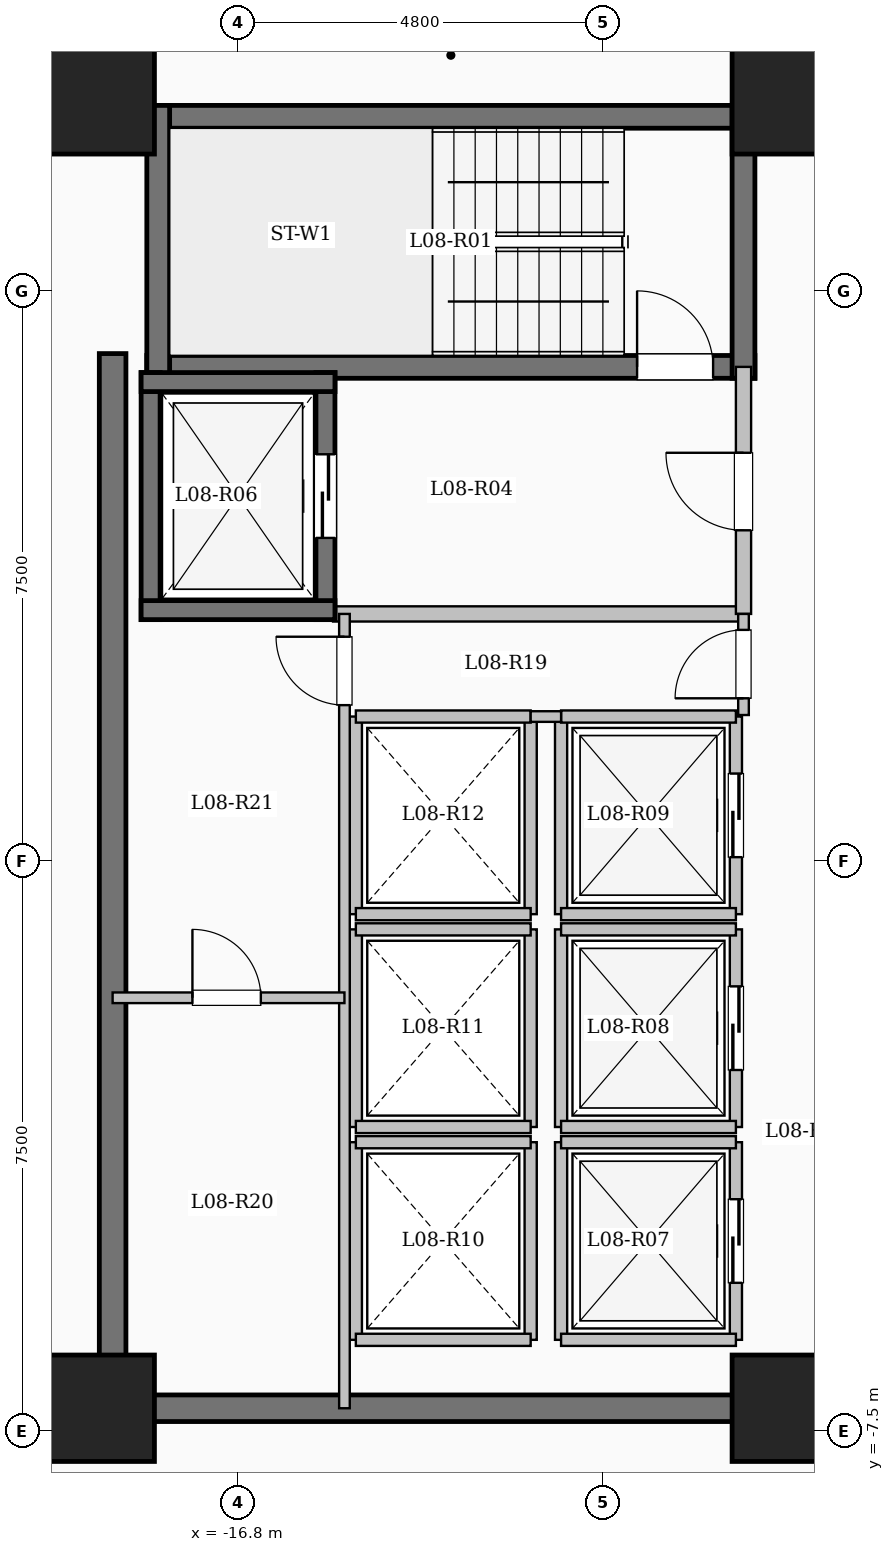
"""IFC4 building model, lengths in metres.
Left out: names, types, materials, properties, quantities, classifications, styles, units other than length and angle.
Written with IfcOpenShell. Run it as: python <this file> out.ifc"""

import sys

from ifc_helpers import new_model, si_unit, direction, frame, frame_2d, origin, origin_2d, place, context, subcontext, project, spatial, rectangle, extrude, element, fill, save


model = new_model("IFC4")
c1 = context("Model", 3, precision=1e-05, world=origin(), true_north=direction((0.0, 1.0)))
c2 = subcontext(c1, "Body", "Model", "MODEL_VIEW")
j1 = project(units=[si_unit("LENGTHUNIT", "METRE"), si_unit("PLANEANGLEUNIT", "RADIAN")], contexts=[c1])
p1 = place(None, origin())
s1 = spatial("IfcSite", under=j1, at=p1, CompositionType="ELEMENT")
p2 = place(p1, origin())
s2 = spatial("IfcBuilding", under=s1, at=p2, CompositionType="ELEMENT")
p3 = place(p2, frame((0.0, 0.0, 34.05)))
s3 = spatial("IfcBuildingStorey", under=s2, at=p3, CompositionType="ELEMENT", Elevation=34.05)
for number, where, z_axis, x_axis in (
    (1, (-9.6, -7.2, 0.0), (0.0, 0.0, 1.0), (1.0, 0.0, 0.0)),
    (2, (-9.6, 10.0, 0.0), (0.0, 0.0, 1.0), (1.0, 0.0, 0.0)),
    (3, (-18.6, -7.2, 0.0), (0.0, 0.0, 1.0), (1.0, 0.0, 0.0)),
    (4, (-18.6, 10.0, 0.0), (0.0, 0.0, 1.0), (1.0, 0.0, 0.0)),
):
    element("IfcColumn", number, at=place(p3, frame(where, z_axis=z_axis, x_axis=x_axis)), inside=s3, PredefinedType="COLUMN", context=c2, shape_type="SweptSolid", body=[
        extrude(rectangle(XDim=1.4, YDim=1.4, at=origin_2d()), origin(), (0.0, 0.0, 1.0), 3.35),
    ])
p4 = place(p3, frame((-18.0, 9.79, 0.0), z_axis=(0.0, 0.0, 1.0), x_axis=(1.0, 0.0, 0.0)))
e5 = element("IfcWall", 5, at=p4, inside=s3, PredefinedType="SHEAR", context=c2, shape_type="SweptSolid", body=[
    extrude(rectangle(XDim=8.0, YDim=0.3, at=frame_2d((4.0, 0.0))), origin(), (0.0, 0.0, 1.0), 3.35),
])
p5 = place(p3, frame((-18.0, 6.5, 0.0), z_axis=(0.0, 0.0, 1.0), x_axis=(1.0, 0.0, 0.0)))
e6 = element("IfcWall", 6, at=p5, inside=s3, PredefinedType="SHEAR", context=c2, shape_type="SweptSolid", body=[
    extrude(rectangle(XDim=8.0, YDim=0.3, at=frame_2d((4.0, 0.0))), origin(), (0.0, 0.0, 1.0), 3.35),
])
p6 = place(p5, frame((6.45, 0.0, 0.0)))
e7 = element("IfcOpeningElement", 7, at=p6, cuts=e6, PredefinedType="OPENING", context=c2, shape_type="SweptSolid", body=[
    extrude(rectangle(XDim=1.0, YDim=2.15, at=frame_2d((0.5, 1.075))), frame((0.0, 0.16, 0.0), z_axis=(0.0, -1.0, 0.0), x_axis=(1.0, 0.0, 0.0)), (0.0, 0.0, 1.0), 0.32),
])
for number, where, z_axis, x_axis in (
    (8, (-17.85, 6.35, 0.0), (0.0, 0.0, 1.0), (0.0, 1.0, 0.0)),
    (9, (-10.15, 6.35, 0.0), (0.0, 0.0, 1.0), (0.0, 1.0, 0.0)),
):
    element("IfcWall", number, at=place(p3, frame(where, z_axis=z_axis, x_axis=x_axis)), inside=s3, PredefinedType="SHEAR", context=c2, shape_type="SweptSolid", body=[
        extrude(rectangle(XDim=3.59, YDim=0.3, at=frame_2d((1.795, 0.0))), origin(), (0.0, 0.0, 1.0), 3.35),
    ])
p7 = place(p3, frame((-15.55, 3.25, 0.0), z_axis=(0.0, 0.0, 1.0), x_axis=(1.0, 0.0, 0.0)))
e10 = element("IfcWall", 10, at=p7, inside=s3, PredefinedType="SOLIDWALL", context=c2, shape_type="SweptSolid", body=[
    extrude(rectangle(XDim=5.4, YDim=0.2, at=frame_2d((2.7, 0.0))), origin(), (0.0, 0.0, 1.0), 3.1),
])
p8 = place(p3, frame((-10.15, 3.25, 0.0), z_axis=(0.0, 0.0, 1.0), x_axis=(0.0, 1.0, 0.0)))
e11 = element("IfcWall", 11, at=p8, inside=s3, PredefinedType="SOLIDWALL", context=c2, shape_type="SweptSolid", body=[
    extrude(rectangle(XDim=3.25, YDim=0.2, at=frame_2d((1.625, 0.0))), origin(), (0.0, 0.0, 1.0), 3.1),
])
p9 = place(p8, frame((1.1, 0.0, 0.0)))
e12 = element("IfcOpeningElement", 12, at=p9, cuts=e11, PredefinedType="OPENING", context=c2, shape_type="SweptSolid", body=[
    extrude(rectangle(XDim=1.02, YDim=2.15, at=frame_2d((0.51, 1.075))), frame((0.0, 0.11, 0.0), z_axis=(0.0, -1.0, 0.0), x_axis=(1.0, 0.0, 0.0)), (0.0, 0.0, 1.0), 0.22),
])
p10 = place(p3, frame((-17.95, 3.175, 0.0), z_axis=(0.0, 0.0, 1.0), x_axis=(0.0, 1.0, 0.0)))
e13 = element("IfcWall", 13, at=p10, inside=s3, PredefinedType="SHEAR", context=c2, shape_type="SweptSolid", body=[
    extrude(rectangle(XDim=3.25, YDim=0.25, at=frame_2d((1.625, 0.0))), origin(), (0.0, 0.0, 1.0), 3.35),
])
p11 = place(p3, frame((-15.65, 3.175, 0.0), z_axis=(0.0, 0.0, 1.0), x_axis=(0.0, 1.0, 0.0)))
e14 = element("IfcWall", 14, at=p11, inside=s3, PredefinedType="SHEAR", context=c2, shape_type="SweptSolid", body=[
    extrude(rectangle(XDim=3.25, YDim=0.25, at=frame_2d((1.625, 0.0))), origin(), (0.0, 0.0, 1.0), 3.35),
])
p12 = place(p11, frame((1.075, 0.0, 0.0)))
e15 = element("IfcOpeningElement", 15, at=p12, cuts=e14, PredefinedType="OPENING", context=c2, shape_type="SweptSolid", body=[
    extrude(rectangle(XDim=1.1, YDim=2.15, at=frame_2d((0.55, 1.075))), frame((0.0, 0.135, 0.0), z_axis=(0.0, -1.0, 0.0), x_axis=(1.0, 0.0, 0.0)), (0.0, 0.0, 1.0), 0.27),
])
for number, where, z_axis, x_axis in (
    (16, (-18.075, 3.3, 0.0), (0.0, 0.0, 1.0), (1.0, 0.0, 0.0)),
    (17, (-18.075, 6.3, 0.0), (0.0, 0.0, 1.0), (1.0, 0.0, 0.0)),
):
    element("IfcWall", number, at=place(p3, frame(where, z_axis=z_axis, x_axis=x_axis)), inside=s3, PredefinedType="SHEAR", context=c2, shape_type="SweptSolid", body=[
        extrude(rectangle(XDim=2.55, YDim=0.25, at=frame_2d((1.275, 0.0))), origin(), (0.0, 0.0, 1.0), 3.35),
    ])
p13 = place(p3, frame((-12.55, -6.3, 0.0), z_axis=(0.0, 0.0, 1.0), x_axis=(0.0, 1.0, 0.0)))
e18 = element("IfcWall", 18, at=p13, inside=s3, PredefinedType="SOLIDWALL", context=c2, shape_type="SweptSolid", body=[
    extrude(rectangle(XDim=2.6, YDim=0.16, at=frame_2d((1.3, 0.0))), origin(), (0.0, 0.0, 1.0), 3.1),
])
p14 = place(p3, frame((-10.25, -6.3, 0.0), z_axis=(0.0, 0.0, 1.0), x_axis=(0.0, 1.0, 0.0)))
e19 = element("IfcWall", 19, at=p14, inside=s3, PredefinedType="SOLIDWALL", context=c2, shape_type="SweptSolid", body=[
    extrude(rectangle(XDim=2.6, YDim=0.16, at=frame_2d((1.3, 0.0))), origin(), (0.0, 0.0, 1.0), 3.1),
])
p15 = place(p14, frame((0.75, 0.0, 0.0)))
e20 = element("IfcOpeningElement", 20, at=p15, cuts=e19, PredefinedType="OPENING", context=c2, shape_type="SweptSolid", body=[
    extrude(rectangle(XDim=1.1, YDim=2.15, at=frame_2d((0.55, 1.075))), frame((0.0, 0.09, 0.0), z_axis=(0.0, -1.0, 0.0), x_axis=(1.0, 0.0, 0.0)), (0.0, 0.0, 1.0), 0.18),
])
for number, where, z_axis, x_axis in (
    (21, (-12.55, -6.3, 0.0), (0.0, 0.0, 1.0), (1.0, 0.0, 0.0)),
    (22, (-12.55, -3.7, 0.0), (0.0, 0.0, 1.0), (1.0, 0.0, 0.0)),
):
    element("IfcWall", number, at=place(p3, frame(where, z_axis=z_axis, x_axis=x_axis)), inside=s3, PredefinedType="SOLIDWALL", context=c2, shape_type="SweptSolid", body=[
        extrude(rectangle(XDim=2.3, YDim=0.16, at=frame_2d((1.15, 0.0))), origin(), (0.0, 0.0, 1.0), 3.1),
    ])
p16 = place(p3, frame((-12.55, -3.5, 0.0), z_axis=(0.0, 0.0, 1.0), x_axis=(0.0, 1.0, 0.0)))
e23 = element("IfcWall", 23, at=p16, inside=s3, PredefinedType="SOLIDWALL", context=c2, shape_type="SweptSolid", body=[
    extrude(rectangle(XDim=2.6, YDim=0.16, at=frame_2d((1.3, 0.0))), origin(), (0.0, 0.0, 1.0), 3.1),
])
p17 = place(p3, frame((-10.25, -3.5, 0.0), z_axis=(0.0, 0.0, 1.0), x_axis=(0.0, 1.0, 0.0)))
e24 = element("IfcWall", 24, at=p17, inside=s3, PredefinedType="SOLIDWALL", context=c2, shape_type="SweptSolid", body=[
    extrude(rectangle(XDim=2.6, YDim=0.16, at=frame_2d((1.3, 0.0))), origin(), (0.0, 0.0, 1.0), 3.1),
])
p18 = place(p17, frame((0.75, 0.0, 0.0)))
e25 = element("IfcOpeningElement", 25, at=p18, cuts=e24, PredefinedType="OPENING", context=c2, shape_type="SweptSolid", body=[
    extrude(rectangle(XDim=1.1, YDim=2.15, at=frame_2d((0.55, 1.075))), frame((0.0, 0.09, 0.0), z_axis=(0.0, -1.0, 0.0), x_axis=(1.0, 0.0, 0.0)), (0.0, 0.0, 1.0), 0.18),
])
for number, where, z_axis, x_axis in (
    (26, (-12.55, -3.5, 0.0), (0.0, 0.0, 1.0), (1.0, 0.0, 0.0)),
    (27, (-12.55, -0.9, 0.0), (0.0, 0.0, 1.0), (1.0, 0.0, 0.0)),
):
    element("IfcWall", number, at=place(p3, frame(where, z_axis=z_axis, x_axis=x_axis)), inside=s3, PredefinedType="SOLIDWALL", context=c2, shape_type="SweptSolid", body=[
        extrude(rectangle(XDim=2.3, YDim=0.16, at=frame_2d((1.15, 0.0))), origin(), (0.0, 0.0, 1.0), 3.1),
    ])
p19 = place(p3, frame((-12.55, -0.7, 0.0), z_axis=(0.0, 0.0, 1.0), x_axis=(0.0, 1.0, 0.0)))
e28 = element("IfcWall", 28, at=p19, inside=s3, PredefinedType="SOLIDWALL", context=c2, shape_type="SweptSolid", body=[
    extrude(rectangle(XDim=2.6, YDim=0.16, at=frame_2d((1.3, 0.0))), origin(), (0.0, 0.0, 1.0), 3.1),
])
p20 = place(p3, frame((-10.25, -0.7, 0.0), z_axis=(0.0, 0.0, 1.0), x_axis=(0.0, 1.0, 0.0)))
e29 = element("IfcWall", 29, at=p20, inside=s3, PredefinedType="SOLIDWALL", context=c2, shape_type="SweptSolid", body=[
    extrude(rectangle(XDim=2.6, YDim=0.16, at=frame_2d((1.3, 0.0))), origin(), (0.0, 0.0, 1.0), 3.1),
])
p21 = place(p20, frame((0.75, 0.0, 0.0)))
e30 = element("IfcOpeningElement", 30, at=p21, cuts=e29, PredefinedType="OPENING", context=c2, shape_type="SweptSolid", body=[
    extrude(rectangle(XDim=1.1, YDim=2.15, at=frame_2d((0.55, 1.075))), frame((0.0, 0.09, 0.0), z_axis=(0.0, -1.0, 0.0), x_axis=(1.0, 0.0, 0.0)), (0.0, 0.0, 1.0), 0.18),
])
for number, where, z_axis, x_axis in (
    (31, (-12.55, -0.7, 0.0), (0.0, 0.0, 1.0), (1.0, 0.0, 0.0)),
    (32, (-12.55, 1.9, 0.0), (0.0, 0.0, 1.0), (1.0, 0.0, 0.0)),
):
    element("IfcWall", number, at=place(p3, frame(where, z_axis=z_axis, x_axis=x_axis)), inside=s3, PredefinedType="SOLIDWALL", context=c2, shape_type="SweptSolid", body=[
        extrude(rectangle(XDim=2.3, YDim=0.16, at=frame_2d((1.15, 0.0))), origin(), (0.0, 0.0, 1.0), 3.1),
    ])
for number, where, z_axis, x_axis in (
    (33, (-15.25, -6.3, 0.0), (0.0, 0.0, 1.0), (0.0, 1.0, 0.0)),
    (34, (-12.95, -6.3, 0.0), (0.0, 0.0, 1.0), (0.0, 1.0, 0.0)),
):
    element("IfcWall", number, at=place(p3, frame(where, z_axis=z_axis, x_axis=x_axis)), inside=s3, PredefinedType="SOLIDWALL", context=c2, shape_type="SweptSolid", body=[
        extrude(rectangle(XDim=2.6, YDim=0.16, at=frame_2d((1.3, 0.0))), origin(), (0.0, 0.0, 1.0), 3.1),
    ])
for number, where, z_axis, x_axis in (
    (35, (-15.25, -6.3, 0.0), (0.0, 0.0, 1.0), (1.0, 0.0, 0.0)),
    (36, (-15.25, -3.7, 0.0), (0.0, 0.0, 1.0), (1.0, 0.0, 0.0)),
):
    element("IfcWall", number, at=place(p3, frame(where, z_axis=z_axis, x_axis=x_axis)), inside=s3, PredefinedType="SOLIDWALL", context=c2, shape_type="SweptSolid", body=[
        extrude(rectangle(XDim=2.3, YDim=0.16, at=frame_2d((1.15, 0.0))), origin(), (0.0, 0.0, 1.0), 3.1),
    ])
for number, where, z_axis, x_axis in (
    (37, (-15.25, -3.5, 0.0), (0.0, 0.0, 1.0), (0.0, 1.0, 0.0)),
    (38, (-12.95, -3.5, 0.0), (0.0, 0.0, 1.0), (0.0, 1.0, 0.0)),
):
    element("IfcWall", number, at=place(p3, frame(where, z_axis=z_axis, x_axis=x_axis)), inside=s3, PredefinedType="SOLIDWALL", context=c2, shape_type="SweptSolid", body=[
        extrude(rectangle(XDim=2.6, YDim=0.16, at=frame_2d((1.3, 0.0))), origin(), (0.0, 0.0, 1.0), 3.1),
    ])
for number, where, z_axis, x_axis in (
    (39, (-15.25, -3.5, 0.0), (0.0, 0.0, 1.0), (1.0, 0.0, 0.0)),
    (40, (-15.25, -0.9, 0.0), (0.0, 0.0, 1.0), (1.0, 0.0, 0.0)),
):
    element("IfcWall", number, at=place(p3, frame(where, z_axis=z_axis, x_axis=x_axis)), inside=s3, PredefinedType="SOLIDWALL", context=c2, shape_type="SweptSolid", body=[
        extrude(rectangle(XDim=2.3, YDim=0.16, at=frame_2d((1.15, 0.0))), origin(), (0.0, 0.0, 1.0), 3.1),
    ])
for number, where, z_axis, x_axis in (
    (41, (-15.25, -0.7, 0.0), (0.0, 0.0, 1.0), (0.0, 1.0, 0.0)),
    (42, (-12.95, -0.7, 0.0), (0.0, 0.0, 1.0), (0.0, 1.0, 0.0)),
):
    element("IfcWall", number, at=place(p3, frame(where, z_axis=z_axis, x_axis=x_axis)), inside=s3, PredefinedType="SOLIDWALL", context=c2, shape_type="SweptSolid", body=[
        extrude(rectangle(XDim=2.6, YDim=0.16, at=frame_2d((1.3, 0.0))), origin(), (0.0, 0.0, 1.0), 3.1),
    ])
for number, where, z_axis, x_axis in (
    (43, (-15.25, -0.7, 0.0), (0.0, 0.0, 1.0), (1.0, 0.0, 0.0)),
    (44, (-15.25, 1.9, 0.0), (0.0, 0.0, 1.0), (1.0, 0.0, 0.0)),
):
    element("IfcWall", number, at=place(p3, frame(where, z_axis=z_axis, x_axis=x_axis)), inside=s3, PredefinedType="SOLIDWALL", context=c2, shape_type="SweptSolid", body=[
        extrude(rectangle(XDim=2.3, YDim=0.16, at=frame_2d((1.15, 0.0))), origin(), (0.0, 0.0, 1.0), 3.1),
    ])
p22 = place(p3, frame((-18.45, -7.375, 0.0), z_axis=(0.0, 0.0, 1.0), x_axis=(0.0, 1.0, 0.0)))
e45 = element("IfcWall", 45, at=p22, inside=s3, PredefinedType="SHEAR", context=c2, shape_type="SweptSolid", body=[
    extrude(rectangle(XDim=14.05, YDim=0.35, at=frame_2d((7.025, 0.0))), origin(), (0.0, 0.0, 1.0), 3.35),
])
p23 = place(p3, frame((-18.625, -7.2, 0.0), z_axis=(0.0, 0.0, 1.0), x_axis=(1.0, 0.0, 0.0)))
e46 = element("IfcWall", 46, at=p23, inside=s3, PredefinedType="SHEAR", context=c2, shape_type="SweptSolid", body=[
    extrude(rectangle(XDim=8.55, YDim=0.35, at=frame_2d((4.275, 0.0))), origin(), (0.0, 0.0, 1.0), 3.35),
])
p24 = place(p3, frame((-12.95, 1.9, 0.0), z_axis=(0.0, 0.0, 1.0), x_axis=(1.0, 0.0, 0.0)))
e47 = element("IfcWall", 47, at=p24, inside=s3, PredefinedType="PARTITIONING", context=c2, shape_type="SweptSolid", body=[
    extrude(rectangle(XDim=0.4, YDim=0.14, at=frame_2d((0.2, 0.0))), origin(), (0.0, 0.0, 1.0), 3.1),
])
p25 = place(p3, frame((-10.15, 1.92, 0.0), z_axis=(0.0, 0.0, 1.0), x_axis=(0.0, 1.0, 0.0)))
e48 = element("IfcWall", 48, at=p25, inside=s3, PredefinedType="PARTITIONING", context=c2, shape_type="SweptSolid", body=[
    extrude(rectangle(XDim=1.33, YDim=0.14, at=frame_2d((0.665, 0.0))), origin(), (0.0, 0.0, 1.0), 3.1),
])
p26 = place(p25, frame((0.22, 0.0, 0.0)))
e49 = element("IfcOpeningElement", 49, at=p26, cuts=e48, PredefinedType="OPENING", context=c2, shape_type="SweptSolid", body=[
    extrude(rectangle(XDim=0.9, YDim=2.08, at=frame_2d((0.45, 1.04))), frame((0.0, 0.08, 0.0), z_axis=(0.0, -1.0, 0.0), x_axis=(1.0, 0.0, 0.0)), (0.0, 0.0, 1.0), 0.16),
])
p27 = place(p3, frame((-15.4, -7.2, 0.0), z_axis=(0.0, 0.0, 1.0), x_axis=(0.0, 1.0, 0.0)))
e50 = element("IfcWall", 50, at=p27, inside=s3, PredefinedType="PARTITIONING", context=c2, shape_type="SweptSolid", body=[
    extrude(rectangle(XDim=10.45, YDim=0.14, at=frame_2d((5.225, 0.0))), origin(), (0.0, 0.0, 1.0), 3.1),
])
p28 = place(p27, frame((9.25, 0.0, 0.0)))
e51 = element("IfcOpeningElement", 51, at=p28, cuts=e50, PredefinedType="OPENING", context=c2, shape_type="SweptSolid", body=[
    extrude(rectangle(XDim=0.9, YDim=2.08, at=frame_2d((0.45, 1.04))), frame((0.0, 0.08, 0.0), z_axis=(0.0, -1.0, 0.0), x_axis=(1.0, 0.0, 0.0)), (0.0, 0.0, 1.0), 0.16),
])
p29 = place(p3, frame((-18.45, -1.8, 0.0), z_axis=(0.0, 0.0, 1.0), x_axis=(1.0, 0.0, 0.0)))
e52 = element("IfcWall", 52, at=p29, inside=s3, PredefinedType="PARTITIONING", context=c2, shape_type="SweptSolid", body=[
    extrude(rectangle(XDim=3.05, YDim=0.14, at=frame_2d((1.525, 0.0))), origin(), (0.0, 0.0, 1.0), 3.1),
])
p30 = place(p29, frame((1.05, 0.0, 0.0)))
e53 = element("IfcOpeningElement", 53, at=p30, cuts=e52, PredefinedType="OPENING", context=c2, shape_type="SweptSolid", body=[
    extrude(rectangle(XDim=0.9, YDim=2.08, at=frame_2d((0.45, 1.04))), frame((0.0, 0.08, 0.0), z_axis=(0.0, -1.0, 0.0), x_axis=(1.0, 0.0, 0.0)), (0.0, 0.0, 1.0), 0.16),
])
p31 = place(p3, frame((-28.68, -7.25, 0.0), z_axis=(0.0, 0.0, 1.0), x_axis=(1.0, 0.0, 0.0)))
e54 = element("IfcWall", 54, at=p31, inside=s3, PredefinedType="PARTITIONING", context=c2, shape_type="SweptSolid", body=[
    extrude(rectangle(XDim=10.23, YDim=0.15, at=frame_2d((5.115, 0.0))), origin(), (0.0, 0.0, 1.0), 3.1),
])
p32 = place(p31, frame((7.03, 0.0, 0.0)))
e55 = element("IfcOpeningElement", 55, at=p32, cuts=e54, PredefinedType="OPENING", context=c2, shape_type="SweptSolid", body=[
    extrude(rectangle(XDim=1.08, YDim=2.15, at=frame_2d((0.54, 1.075))), frame((0.0, 0.085, 0.0), z_axis=(0.0, -1.0, 0.0), x_axis=(1.0, 0.0, 0.0)), (0.0, 0.0, 1.0), 0.17),
])
p33 = place(p6, origin())
e56 = element("IfcDoor", 56, at=p33, inside=s3, OperationType="SINGLE_SWING_LEFT", PredefinedType="DOOR", context=c2, shape_type="SweptSolid", body=[
    extrude(rectangle(XDim=1.0, YDim=2.15, at=frame_2d((0.5, 1.075))), frame((0.0, 0.025, 0.0), z_axis=(0.0, -1.0, 0.0), x_axis=(1.0, 0.0, 0.0)), (0.0, 0.0, 1.0), 0.05),
])
fill(e7, e56)
p34 = place(p9, origin())
e57 = element("IfcDoor", 57, at=p34, inside=s3, OperationType="SINGLE_SWING_RIGHT", PredefinedType="DOOR", context=c2, shape_type="SweptSolid", body=[
    extrude(rectangle(XDim=1.02, YDim=2.15, at=frame_2d((0.51, 1.075))), frame((0.0, 0.025, 0.0), z_axis=(0.0, -1.0, 0.0), x_axis=(1.0, 0.0, 0.0)), (0.0, 0.0, 1.0), 0.05),
])
fill(e12, e57)
p35 = place(p12, origin())
e58 = element("IfcDoor", 58, at=p35, inside=s3, OperationType="SLIDING_TO_LEFT", PredefinedType="DOOR", context=c2, shape_type="SweptSolid", body=[
    extrude(rectangle(XDim=1.1, YDim=2.15, at=frame_2d((0.55, 1.075))), frame((0.0, 0.025, 0.0), z_axis=(0.0, -1.0, 0.0), x_axis=(1.0, 0.0, 0.0)), (0.0, 0.0, 1.0), 0.05),
])
fill(e15, e58)
p36 = place(p15, origin())
e59 = element("IfcDoor", 59, at=p36, inside=s3, OperationType="SLIDING_TO_LEFT", PredefinedType="DOOR", context=c2, shape_type="SweptSolid", body=[
    extrude(rectangle(XDim=1.1, YDim=2.15, at=frame_2d((0.55, 1.075))), frame((0.0, 0.025, 0.0), z_axis=(0.0, -1.0, 0.0), x_axis=(1.0, 0.0, 0.0)), (0.0, 0.0, 1.0), 0.05),
])
fill(e20, e59)
p37 = place(p18, origin())
e60 = element("IfcDoor", 60, at=p37, inside=s3, OperationType="SLIDING_TO_LEFT", PredefinedType="DOOR", context=c2, shape_type="SweptSolid", body=[
    extrude(rectangle(XDim=1.1, YDim=2.15, at=frame_2d((0.55, 1.075))), frame((0.0, 0.025, 0.0), z_axis=(0.0, -1.0, 0.0), x_axis=(1.0, 0.0, 0.0)), (0.0, 0.0, 1.0), 0.05),
])
fill(e25, e60)
p38 = place(p21, origin())
e61 = element("IfcDoor", 61, at=p38, inside=s3, OperationType="SLIDING_TO_LEFT", PredefinedType="DOOR", context=c2, shape_type="SweptSolid", body=[
    extrude(rectangle(XDim=1.1, YDim=2.15, at=frame_2d((0.55, 1.075))), frame((0.0, 0.025, 0.0), z_axis=(0.0, -1.0, 0.0), x_axis=(1.0, 0.0, 0.0)), (0.0, 0.0, 1.0), 0.05),
])
fill(e30, e61)
p39 = place(p26, origin())
e62 = element("IfcDoor", 62, at=p39, inside=s3, OperationType="SINGLE_SWING_LEFT", PredefinedType="DOOR", context=c2, shape_type="SweptSolid", body=[
    extrude(rectangle(XDim=0.9, YDim=2.08, at=frame_2d((0.45, 1.04))), frame((0.0, 0.025, 0.0), z_axis=(0.0, -1.0, 0.0), x_axis=(1.0, 0.0, 0.0)), (0.0, 0.0, 1.0), 0.05),
])
fill(e49, e62)
p40 = place(p28, origin())
e63 = element("IfcDoor", 63, at=p40, inside=s3, OperationType="SINGLE_SWING_RIGHT", PredefinedType="DOOR", context=c2, shape_type="SweptSolid", body=[
    extrude(rectangle(XDim=0.9, YDim=2.08, at=frame_2d((0.45, 1.04))), frame((0.0, 0.025, 0.0), z_axis=(0.0, -1.0, 0.0), x_axis=(1.0, 0.0, 0.0)), (0.0, 0.0, 1.0), 0.05),
])
fill(e51, e63)
p41 = place(p30, origin())
e64 = element("IfcDoor", 64, at=p41, inside=s3, OperationType="SINGLE_SWING_LEFT", PredefinedType="DOOR", context=c2, shape_type="SweptSolid", body=[
    extrude(rectangle(XDim=0.9, YDim=2.08, at=frame_2d((0.45, 1.04))), frame((0.0, 0.025, 0.0), z_axis=(0.0, -1.0, 0.0), x_axis=(1.0, 0.0, 0.0)), (0.0, 0.0, 1.0), 0.05),
])
fill(e53, e64)
save(model, sys.argv[1])
